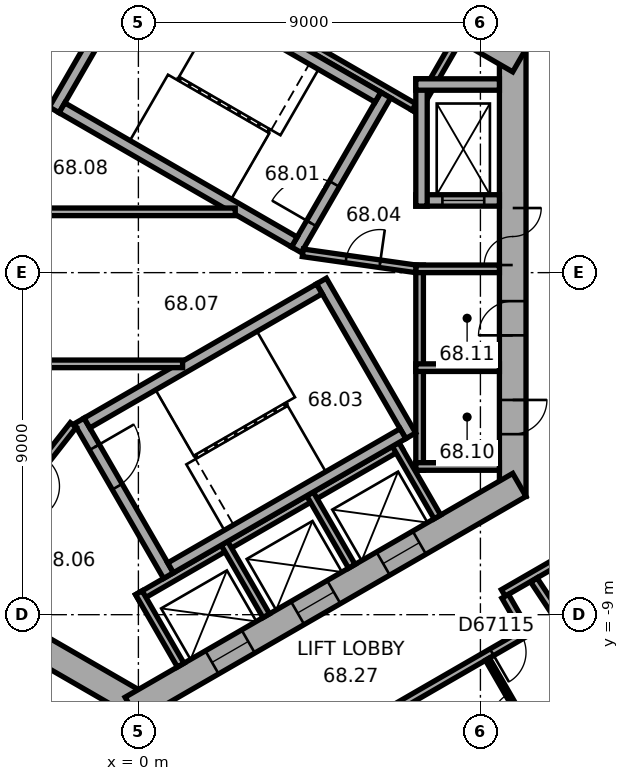
"""IFC4 building model, lengths in metres.
Left out: names, types, materials, properties, quantities, classifications, styles, units other than length and angle.
Written with IfcOpenShell. Run it as: python <this file> out.ifc"""

import sys

from ifc_helpers import new_model, si_unit, direction, frame, frame_2d, origin, place, context, subcontext, project, spatial, rectangle, extrude, element, fill, save


model = new_model("IFC4")
c1 = context("Model", 3, precision=1e-05, world=origin(), true_north=direction((0.0, 1.0)))
c2 = subcontext(c1, "Body", "Model", "MODEL_VIEW")
j1 = project(units=[si_unit("LENGTHUNIT", "METRE"), si_unit("PLANEANGLEUNIT", "RADIAN")], contexts=[c1])
p1 = place(None, origin())
s1 = spatial("IfcSite", under=j1, at=p1, CompositionType="ELEMENT")
p2 = place(p1, origin())
s2 = spatial("IfcBuilding", under=s1, at=p2, CompositionType="ELEMENT")
p3 = place(p2, frame((0.0, 0.0, 274.6)))
s3 = spatial("IfcBuildingStorey", under=s2, at=p3, CompositionType="ELEMENT", Elevation=274.6)
p4 = place(p3, frame((9.85, -5.889, 0.0), z_axis=(0.0, 0.0, 1.0), x_axis=(0.0, 1.0, 0.0)))
e1 = element("IfcWall", 1, at=p4, inside=s3, PredefinedType="SHEAR", context=c2, shape_type="SweptSolid", body=[
    extrude(rectangle(XDim=11.778, YDim=0.7, at=frame_2d((5.889, 0.0))), origin(), (0.0, 0.0, 1.0), 3.7),
])
p5 = place(p4, frame((6.089, 0.0, 0.0)))
e2 = element("IfcOpeningElement", 2, at=p5, cuts=e1, PredefinedType="OPENING", context=c2, shape_type="SweptSolid", body=[
    extrude(rectangle(XDim=1.5, YDim=2.1, at=frame_2d((0.75, 1.05))), frame((0.0, 0.36, 0.0), z_axis=(0.0, -1.0, 0.0), x_axis=(1.0, 0.0, 0.0)), (0.0, 0.0, 1.0), 0.72),
])
p6 = place(p4, frame((1.639, 0.0, 0.0)))
e3 = element("IfcOpeningElement", 3, at=p6, cuts=e1, PredefinedType="OPENING", context=c2, shape_type="SweptSolid", body=[
    extrude(rectangle(XDim=0.9, YDim=2.1, at=frame_2d((0.45, 1.05))), frame((0.0, 0.36, 0.0), z_axis=(0.0, -1.0, 0.0), x_axis=(1.0, 0.0, 0.0)), (0.0, 0.0, 1.0), 0.72),
])
p7 = place(p4, frame((4.239, 0.0, 0.0)))
e4 = element("IfcOpeningElement", 4, at=p7, cuts=e1, PredefinedType="OPENING", context=c2, shape_type="SweptSolid", body=[
    extrude(rectangle(XDim=0.9, YDim=2.1, at=frame_2d((0.45, 1.05))), frame((0.0, 0.36, 0.0), z_axis=(0.0, -1.0, 0.0), x_axis=(1.0, 0.0, 0.0)), (0.0, 0.0, 1.0), 0.72),
])
p8 = place(p3, frame((10.025, 5.586, 0.0), z_axis=(0.0, 0.0, 1.0), x_axis=(-0.866026453023, 0.499998182661, 0.0)))
e5 = element("IfcWall", 5, at=p8, inside=s3, PredefinedType="SHEAR", context=c2, shape_type="SweptSolid", body=[
    extrude(rectangle(XDim=11.778, YDim=0.7, at=frame_2d((5.889, 0.0))), origin(), (0.0, 0.0, 1.0), 3.7),
])
p9 = place(p8, frame((5.139, 0.0, 0.0)))
e6 = element("IfcOpeningElement", 6, at=p9, cuts=e5, PredefinedType="OPENING", context=c2, shape_type="SweptSolid", body=[
    extrude(rectangle(XDim=0.9, YDim=2.1, at=frame_2d((0.45, 1.05))), frame((0.0, 0.36, 0.0), z_axis=(0.0, -1.0, 0.0), x_axis=(1.0, 0.0, 0.0)), (0.0, 0.0, 1.0), 0.72),
])
p10 = place(p3, frame((0.175, 11.475, 0.0), z_axis=(0.0, 0.0, 1.0), x_axis=(-0.866026453023, -0.499998182661, 0.0)))
e7 = element("IfcWall", 7, at=p10, inside=s3, PredefinedType="SHEAR", context=c2, shape_type="SweptSolid", body=[
    extrude(rectangle(XDim=11.778, YDim=0.7, at=frame_2d((5.889, 0.0))), origin(), (0.0, 0.0, 1.0), 3.7),
])
p11 = place(p10, frame((6.089, 0.0, 0.0)))
e8 = element("IfcOpeningElement", 8, at=p11, cuts=e7, PredefinedType="OPENING", context=c2, shape_type="SweptSolid", body=[
    extrude(rectangle(XDim=1.5, YDim=2.1, at=frame_2d((0.75, 1.05))), frame((0.0, 0.36, 0.0), z_axis=(0.0, -1.0, 0.0), x_axis=(1.0, 0.0, 0.0)), (0.0, 0.0, 1.0), 0.72),
])
p12 = place(p10, frame((1.639, 0.0, 0.0)))
e9 = element("IfcOpeningElement", 9, at=p12, cuts=e7, PredefinedType="OPENING", context=c2, shape_type="SweptSolid", body=[
    extrude(rectangle(XDim=0.9, YDim=2.1, at=frame_2d((0.45, 1.05))), frame((0.0, 0.36, 0.0), z_axis=(0.0, -1.0, 0.0), x_axis=(1.0, 0.0, 0.0)), (0.0, 0.0, 1.0), 0.72),
])
p13 = place(p10, frame((4.239, 0.0, 0.0)))
e10 = element("IfcOpeningElement", 10, at=p13, cuts=e7, PredefinedType="OPENING", context=c2, shape_type="SweptSolid", body=[
    extrude(rectangle(XDim=0.9, YDim=2.1, at=frame_2d((0.45, 1.05))), frame((0.0, 0.36, 0.0), z_axis=(0.0, -1.0, 0.0), x_axis=(1.0, 0.0, 0.0)), (0.0, 0.0, 1.0), 0.72),
])
p14 = place(p3, frame((-10.025, -5.586, 0.0), z_axis=(0.0, 0.0, 1.0), x_axis=(0.866026453023, -0.499998182661, 0.0)))
e11 = element("IfcWall", 11, at=p14, inside=s3, PredefinedType="SHEAR", context=c2, shape_type="SweptSolid", body=[
    extrude(rectangle(XDim=11.778, YDim=0.7, at=frame_2d((5.889, 0.0))), origin(), (0.0, 0.0, 1.0), 3.7),
])
p15 = place(p14, frame((6.089, 0.0, 0.0)))
e12 = element("IfcOpeningElement", 12, at=p15, cuts=e11, PredefinedType="OPENING", context=c2, shape_type="SweptSolid", body=[
    extrude(rectangle(XDim=1.5, YDim=2.1, at=frame_2d((0.75, 1.05))), frame((0.0, 0.36, 0.0), z_axis=(0.0, -1.0, 0.0), x_axis=(1.0, 0.0, 0.0)), (0.0, 0.0, 1.0), 0.72),
])
p16 = place(p14, frame((1.539, 0.0, 0.0)))
e13 = element("IfcOpeningElement", 13, at=p16, cuts=e11, PredefinedType="OPENING", context=c2, shape_type="SweptSolid", body=[
    extrude(rectangle(XDim=1.1, YDim=2.1, at=frame_2d((0.55, 1.05))), frame((0.0, 0.36, 0.0), z_axis=(0.0, -1.0, 0.0), x_axis=(1.0, 0.0, 0.0)), (0.0, 0.0, 1.0), 0.72),
])
p17 = place(p14, frame((4.139, 0.0, 0.0)))
e14 = element("IfcOpeningElement", 14, at=p17, cuts=e11, PredefinedType="OPENING", context=c2, shape_type="SweptSolid", body=[
    extrude(rectangle(XDim=1.1, YDim=2.1, at=frame_2d((0.55, 1.05))), frame((0.0, 0.36, 0.0), z_axis=(0.0, -1.0, 0.0), x_axis=(1.0, 0.0, 0.0)), (0.0, 0.0, 1.0), 0.72),
])
p18 = place(p3, frame((-0.175, -11.475, 0.0), z_axis=(0.0, 0.0, 1.0), x_axis=(0.866026453023, 0.499998182661, 0.0)))
e15 = element("IfcWall", 15, at=p18, inside=s3, PredefinedType="SHEAR", context=c2, shape_type="SweptSolid", body=[
    extrude(rectangle(XDim=11.778, YDim=0.7, at=frame_2d((5.889, 0.0))), origin(), (0.0, 0.0, 1.0), 3.7),
])
p19 = place(p18, frame((2.439, 0.0, 0.0)))
e16 = element("IfcOpeningElement", 16, at=p19, cuts=e15, PredefinedType="OPENING", context=c2, shape_type="SweptSolid", body=[
    extrude(rectangle(XDim=1.1, YDim=2.1, at=frame_2d((0.55, 1.05))), frame((0.0, 0.36, 0.0), z_axis=(0.0, -1.0, 0.0), x_axis=(1.0, 0.0, 0.0)), (0.0, 0.0, 1.0), 0.72),
])
p20 = place(p18, frame((5.039, 0.0, 0.0)))
e17 = element("IfcOpeningElement", 17, at=p20, cuts=e15, PredefinedType="OPENING", context=c2, shape_type="SweptSolid", body=[
    extrude(rectangle(XDim=1.1, YDim=2.1, at=frame_2d((0.55, 1.05))), frame((0.0, 0.36, 0.0), z_axis=(0.0, -1.0, 0.0), x_axis=(1.0, 0.0, 0.0)), (0.0, 0.0, 1.0), 0.72),
])
p21 = place(p18, frame((7.639, 0.0, 0.0)))
e18 = element("IfcOpeningElement", 18, at=p21, cuts=e15, PredefinedType="OPENING", context=c2, shape_type="SweptSolid", body=[
    extrude(rectangle(XDim=1.1, YDim=2.1, at=frame_2d((0.55, 1.05))), frame((0.0, 0.36, 0.0), z_axis=(0.0, -1.0, 0.0), x_axis=(1.0, 0.0, 0.0)), (0.0, 0.0, 1.0), 0.72),
])
p22 = place(p3, frame((7.4, -5.2, 0.0), z_axis=(0.0, 0.0, 1.0), x_axis=(0.0, 1.0, 0.0)))
e19 = element("IfcWall", 19, at=p22, inside=s3, PredefinedType="PARTITIONING", context=c2, shape_type="SweptSolid", body=[
    extrude(rectangle(XDim=5.4, YDim=0.2, at=frame_2d((2.7, 0.0))), origin(), (0.0, 0.0, 1.0), 3.35),
])
for number, where, z_axis, x_axis in (
    (20, (7.3, -5.1, 0.0), (0.0, 0.0, 1.0), (1.0, 0.0, 0.0)),
    (21, (7.3, -2.5, 0.0), (0.0, 0.0, 1.0), (1.0, 0.0, 0.0)),
    (22, (7.3, 0.1, 0.0), (0.0, 0.0, 1.0), (1.0, 0.0, 0.0)),
):
    element("IfcWall", number, at=place(p3, frame(where, z_axis=z_axis, x_axis=x_axis)), inside=s3, PredefinedType="PARTITIONING", context=c2, shape_type="SweptSolid", body=[
        extrude(rectangle(XDim=2.2, YDim=0.2, at=frame_2d((1.1, 0.0))), origin(), (0.0, 0.0, 1.0), 3.35),
    ])
p23 = place(p3, frame((7.424, 4.259, 0.0), z_axis=(0.0, 0.0, 1.0), x_axis=(-0.866026010844, 0.49999894854, 0.0)))
e23 = element("IfcWall", 23, at=p23, inside=s3, PredefinedType="PARTITIONING", context=c2, shape_type="SweptSolid", body=[
    extrude(rectangle(XDim=8.0, YDim=0.2, at=frame_2d((4.0, 0.0))), origin(), (0.0, 0.0, 1.0), 3.35),
])
p24 = place(p3, frame((7.287, 4.222, 0.0), z_axis=(0.0, 0.0, 1.0), x_axis=(0.499946605688, 0.86605622881, 0.0)))
e24 = element("IfcWall", 24, at=p24, inside=s3, PredefinedType="PARTITIONING", context=c2, shape_type="SweptSolid", body=[
    extrude(rectangle(XDim=2.2, YDim=0.2, at=frame_2d((1.1, 0.0))), origin(), (0.0, 0.0, 1.0), 3.35),
])
p25 = place(p3, frame((-0.024, -8.559, 0.0), z_axis=(0.0, 0.0, 1.0), x_axis=(0.866026010844, 0.49999894854, 0.0)))
e25 = element("IfcWall", 25, at=p25, inside=s3, PredefinedType="PARTITIONING", context=c2, shape_type="SweptSolid", body=[
    extrude(rectangle(XDim=8.0, YDim=0.2, at=frame_2d((4.0, 0.0))), origin(), (0.0, 0.0, 1.0), 3.35),
])
for number, where, z_axis, x_axis in (
    (26, (0.013, -8.422, 0.0), (0.0, 0.0, 1.0), (0.5, -0.866, 0.0)),
    (27, (2.264, -7.122, 0.0), (0.0, 0.0, 1.0), (0.5, -0.866, 0.0)),
    (28, (4.516, -5.822, 0.0), (0.0, 0.0, 1.0), (0.5, -0.866, 0.0)),
    (29, (6.768, -4.522, 0.0), (0.0, 0.0, 1.0), (0.5, -0.866, 0.0)),
):
    element("IfcWall", number, at=place(p3, frame(where, z_axis=z_axis, x_axis=x_axis)), inside=s3, PredefinedType="PARTITIONING", context=c2, shape_type="SweptSolid", body=[
        extrude(rectangle(XDim=2.2, YDim=0.2, at=frame_2d((1.1, 0.0))), origin(), (0.0, 0.0, 1.0), 3.35),
    ])
p26 = place(p3, frame((4.158, 0.602, 0.0), z_axis=(0.0, 0.0, 1.0), x_axis=(0.499977259774, 0.866038532462, 0.0)))
e30 = element("IfcWall", 30, at=p26, inside=s3, PredefinedType="SHEAR", context=c2, shape_type="SweptSolid", body=[
    extrude(rectangle(XDim=4.7, YDim=0.3, at=frame_2d((2.35, 0.0))), origin(), (0.0, 0.0, 1.0), 3.35),
])
p27 = place(p26, frame((0.8, 0.0, 0.0)))
e31 = element("IfcOpeningElement", 31, at=p27, cuts=e30, PredefinedType="OPENING", context=c2, shape_type="SweptSolid", body=[
    extrude(rectangle(XDim=1.2, YDim=2.1, at=frame_2d((0.6, 1.05))), frame((0.0, 0.16, 0.0), z_axis=(0.0, -1.0, 0.0), x_axis=(1.0, 0.0, 0.0)), (0.0, 0.0, 1.0), 0.32),
])
p28 = place(p3, frame((-2.216, 4.282, 0.0), z_axis=(0.0, 0.0, 1.0), x_axis=(0.499977259774, 0.866038532462, 0.0)))
e32 = element("IfcWall", 32, at=p28, inside=s3, PredefinedType="SHEAR", context=c2, shape_type="SweptSolid", body=[
    extrude(rectangle(XDim=4.7, YDim=0.3, at=frame_2d((2.35, 0.0))), origin(), (0.0, 0.0, 1.0), 3.35),
])
for number, where, z_axis, x_axis in (
    (33, (4.103, 0.807, 0.0), (0.0, 0.0, 1.0), (-0.866, 0.5, 0.0)),
    (34, (6.303, 4.617, 0.0), (0.0, 0.0, 1.0), (-0.866, 0.5, 0.0)),
):
    element("IfcWall", number, at=place(p3, frame(where, z_axis=z_axis, x_axis=x_axis)), inside=s3, PredefinedType="SHEAR", context=c2, shape_type="SweptSolid", body=[
        extrude(rectangle(XDim=7.06, YDim=0.3, at=frame_2d((3.53, 0.0))), origin(), (0.0, 0.0, 1.0), 3.35),
    ])
p29 = place(p3, frame((-1.558, -3.902, 0.0), z_axis=(0.0, 0.0, 1.0), x_axis=(0.499977259774, -0.866038532462, 0.0)))
e35 = element("IfcWall", 35, at=p29, inside=s3, PredefinedType="SHEAR", context=c2, shape_type="SweptSolid", body=[
    extrude(rectangle(XDim=4.7, YDim=0.3, at=frame_2d((2.35, 0.0))), origin(), (0.0, 0.0, 1.0), 3.35),
])
p30 = place(p29, frame((0.8, 0.0, 0.0)))
e36 = element("IfcOpeningElement", 36, at=p30, cuts=e35, PredefinedType="OPENING", context=c2, shape_type="SweptSolid", body=[
    extrude(rectangle(XDim=1.2, YDim=2.1, at=frame_2d((0.6, 1.05))), frame((0.0, 0.16, 0.0), z_axis=(0.0, -1.0, 0.0), x_axis=(1.0, 0.0, 0.0)), (0.0, 0.0, 1.0), 0.32),
])
p31 = place(p3, frame((4.816, -0.222, 0.0), z_axis=(0.0, 0.0, 1.0), x_axis=(0.499977259774, -0.866038532462, 0.0)))
e37 = element("IfcWall", 37, at=p31, inside=s3, PredefinedType="SHEAR", context=c2, shape_type="SweptSolid", body=[
    extrude(rectangle(XDim=4.7, YDim=0.3, at=frame_2d((2.35, 0.0))), origin(), (0.0, 0.0, 1.0), 3.35),
])
for number, where, z_axis, x_axis in (
    (38, (-1.353, -3.957, 0.0), (0.0, 0.0, 1.0), (0.866, 0.5, 0.0)),
    (39, (0.847, -7.767, 0.0), (0.0, 0.0, 1.0), (0.866, 0.5, 0.0)),
):
    element("IfcWall", number, at=place(p3, frame(where, z_axis=z_axis, x_axis=x_axis)), inside=s3, PredefinedType="SHEAR", context=c2, shape_type="SweptSolid", body=[
        extrude(rectangle(XDim=7.06, YDim=0.3, at=frame_2d((3.53, 0.0))), origin(), (0.0, 0.0, 1.0), 3.35),
    ])
p32 = place(p3, frame((7.3, 1.9, 0.0), z_axis=(0.0, 0.0, 1.0), x_axis=(1.0, 0.0, 0.0)))
e40 = element("IfcWall", 40, at=p32, inside=s3, PredefinedType="SHEAR", context=c2, shape_type="SweptSolid", body=[
    extrude(rectangle(XDim=2.2, YDim=0.3, at=frame_2d((1.1, 0.0))), origin(), (0.0, 0.0, 1.0), 3.35),
])
p33 = place(p32, frame((0.7, 0.0, 0.0)))
e41 = element("IfcOpeningElement", 41, at=p33, cuts=e40, PredefinedType="OPENING", context=c2, shape_type="SweptSolid", body=[
    extrude(rectangle(XDim=1.1, YDim=2.1, at=frame_2d((0.55, 1.05))), frame((0.0, 0.16, 0.0), z_axis=(0.0, -1.0, 0.0), x_axis=(1.0, 0.0, 0.0)), (0.0, 0.0, 1.0), 0.32),
])
p34 = place(p3, frame((7.45, 1.75, 0.0), z_axis=(0.0, 0.0, 1.0), x_axis=(0.0, 1.0, 0.0)))
e42 = element("IfcWall", 42, at=p34, inside=s3, PredefinedType="SHEAR", context=c2, shape_type="SweptSolid", body=[
    extrude(rectangle(XDim=3.35, YDim=0.3, at=frame_2d((1.675, 0.0))), origin(), (0.0, 0.0, 1.0), 3.35),
])
p35 = place(p3, frame((7.3, 4.95, 0.0), z_axis=(0.0, 0.0, 1.0), x_axis=(1.0, 0.0, 0.0)))
e43 = element("IfcWall", 43, at=p35, inside=s3, PredefinedType="SHEAR", context=c2, shape_type="SweptSolid", body=[
    extrude(rectangle(XDim=2.2, YDim=0.3, at=frame_2d((1.1, 0.0))), origin(), (0.0, 0.0, 1.0), 3.35),
])
p36 = place(p3, frame((4.327, 0.521, 0.0), z_axis=(0.0, 0.0, 1.0), x_axis=(0.990124376366, -0.14019172346, 0.0)))
e44 = element("IfcWall", 44, at=p36, inside=s3, PredefinedType="PARTITIONING", context=c2, shape_type="SweptSolid", body=[
    extrude(rectangle(XDim=3.002, YDim=0.2, at=frame_2d((1.501, 0.0))), origin(), (0.0, 0.0, 1.0), 3.35),
])
p37 = place(p36, frame((1.15, 0.0, 0.0)))
e45 = element("IfcOpeningElement", 45, at=p37, cuts=e44, PredefinedType="OPENING", context=c2, shape_type="SweptSolid", body=[
    extrude(rectangle(XDim=0.9, YDim=2.1, at=frame_2d((0.45, 1.05))), frame((0.0, 0.11, 0.0), z_axis=(0.0, -1.0, 0.0), x_axis=(1.0, 0.0, 0.0)), (0.0, 0.0, 1.0), 0.22),
])
p38 = place(p3, frame((-1.712, -4.008, 0.0), z_axis=(0.0, 0.0, 1.0), x_axis=(-0.616549420702, -0.787316208287, 0.0)))
e46 = element("IfcWall", 46, at=p38, inside=s3, PredefinedType="PARTITIONING", context=c2, shape_type="SweptSolid", body=[
    extrude(rectangle(XDim=3.002, YDim=0.2, at=frame_2d((1.501, 0.0))), origin(), (0.0, 0.0, 1.0), 3.35),
])
p39 = place(p38, frame((1.15, 0.0, 0.0)))
e47 = element("IfcOpeningElement", 47, at=p39, cuts=e46, PredefinedType="OPENING", context=c2, shape_type="SweptSolid", body=[
    extrude(rectangle(XDim=0.9, YDim=2.1, at=frame_2d((0.45, 1.05))), frame((0.0, 0.11, 0.0), z_axis=(0.0, -1.0, 0.0), x_axis=(1.0, 0.0, 0.0)), (0.0, 0.0, 1.0), 0.22),
])
p40 = place(p3, frame((-2.72, -2.4, 0.0), z_axis=(0.0, 0.0, 1.0), x_axis=(1.0, 0.0, 0.0)))
e48 = element("IfcWall", 48, at=p40, inside=s3, PredefinedType="PARTITIONING", context=c2, shape_type="SweptSolid", body=[
    extrude(rectangle(XDim=3.883, YDim=0.2, at=frame_2d((1.941, 0.0))), origin(), (0.0, 0.0, 1.0), 3.35),
])
p41 = place(p3, frame((-2.72, 1.6, 0.0), z_axis=(0.0, 0.0, 1.0), x_axis=(1.0, 0.0, 0.0)))
e49 = element("IfcWall", 49, at=p41, inside=s3, PredefinedType="PARTITIONING", context=c2, shape_type="SweptSolid", body=[
    extrude(rectangle(XDim=5.269, YDim=0.2, at=frame_2d((2.634, 0.0))), origin(), (0.0, 0.0, 1.0), 3.35),
])
p42 = place(p3, frame((6.71, -11.485, 0.0), z_axis=(0.0, 0.0, 1.0), x_axis=(0.866021232452, 0.500007224889, 0.0)))
e50 = element("IfcWall", 50, at=p42, inside=s3, PredefinedType="PARTITIONING", context=c2, shape_type="SweptSolid", body=[
    extrude(rectangle(XDim=4.032, YDim=0.2, at=frame_2d((2.016, 0.0))), origin(), (0.0, 0.0, 1.0), 3.35),
])
p43 = place(p42, frame((2.991, 0.0, 0.0)))
e51 = element("IfcOpeningElement", 51, at=p43, cuts=e50, PredefinedType="OPENING", context=c2, shape_type="SweptSolid", body=[
    extrude(rectangle(XDim=0.9, YDim=2.1, at=frame_2d((0.45, 1.05))), frame((0.0, 0.11, 0.0), z_axis=(0.0, -1.0, 0.0), x_axis=(1.0, 0.0, 0.0)), (0.0, 0.0, 1.0), 0.22),
])
p44 = place(p3, frame((9.602, -8.428, 0.0), z_axis=(0.0, 0.0, 1.0), x_axis=(0.865999114786, 0.500045531117, 0.0)))
e52 = element("IfcWall", 52, at=p44, inside=s3, PredefinedType="PARTITIONING", context=c2, shape_type="SweptSolid", body=[
    extrude(rectangle(XDim=1.788, YDim=0.2, at=frame_2d((0.894, 0.0))), origin(), (0.0, 0.0, 1.0), 3.35),
])
p45 = place(p3, frame((10.152, -9.382, 0.0), z_axis=(0.0, 0.0, 1.0), x_axis=(-0.499968756647, 0.866043441391, 0.0)))
e53 = element("IfcWall", 53, at=p45, inside=s3, PredefinedType="PARTITIONING", context=c2, shape_type="SweptSolid", body=[
    extrude(rectangle(XDim=1.001, YDim=0.2, at=frame_2d((0.5, 0.0))), origin(), (0.0, 0.0, 1.0), 3.35),
])
p46 = place(p3, frame((10.705, -12.804, 0.0), z_axis=(0.0, 0.0, 1.0), x_axis=(-0.500026023896, 0.86601037836, 0.0)))
e54 = element("IfcWall", 54, at=p46, inside=s3, PredefinedType="PARTITIONING", context=c2, shape_type="SweptSolid", body=[
    extrude(rectangle(XDim=3.04, YDim=0.12, at=frame_2d((1.52, 0.0))), origin(), (0.0, 0.0, 1.0), 3.35),
])
p47 = place(p46, frame((1.07, 0.0, 0.0)))
e55 = element("IfcOpeningElement", 55, at=p47, cuts=e54, PredefinedType="OPENING", context=c2, shape_type="SweptSolid", body=[
    extrude(rectangle(XDim=0.9, YDim=2.1, at=frame_2d((0.45, 1.05))), frame((0.0, 0.07, 0.0), z_axis=(0.0, -1.0, 0.0), x_axis=(1.0, 0.0, 0.0)), (0.0, 0.0, 1.0), 0.14),
])
p48 = place(p3, frame((13.698, -13.059, 0.0), z_axis=(0.0, 0.0, 1.0), x_axis=(-0.551927229301, 0.833892279348, 0.0)))
e56 = element("IfcWall", 56, at=p48, inside=s3, PredefinedType="PARTITIONING", context=c2, shape_type="SweptSolid", body=[
    extrude(rectangle(XDim=5.96, YDim=0.2, at=frame_2d((2.98, 0.0))), origin(), (0.0, 0.0, 1.0), 2.65),
])
p49 = place(p5, origin())
e57 = element("IfcDoor", 57, at=p49, inside=s3, OperationType="DOUBLE_DOOR_SINGLE_SWING", PredefinedType="DOOR", context=c2, shape_type="SweptSolid", body=[
    extrude(rectangle(XDim=1.5, YDim=2.1, at=frame_2d((0.75, 1.05))), frame((0.0, 0.025, 0.0), z_axis=(0.0, -1.0, 0.0), x_axis=(1.0, 0.0, 0.0)), (0.0, 0.0, 1.0), 0.05),
])
fill(e2, e57)
p50 = place(p27, origin())
e58 = element("IfcDoor", 58, at=p50, inside=s3, OperationType="SINGLE_SWING_RIGHT", PredefinedType="DOOR", context=c2, shape_type="SweptSolid", body=[
    extrude(rectangle(XDim=1.2, YDim=2.1, at=frame_2d((0.6, 1.05))), frame((0.0, 0.025, 0.0), z_axis=(0.0, -1.0, 0.0), x_axis=(1.0, 0.0, 0.0)), (0.0, 0.0, 1.0), 0.05),
])
fill(e31, e58)
p51 = place(p30, origin())
e59 = element("IfcDoor", 59, at=p51, inside=s3, OperationType="SINGLE_SWING_RIGHT", PredefinedType="DOOR", context=c2, shape_type="SweptSolid", body=[
    extrude(rectangle(XDim=1.2, YDim=2.1, at=frame_2d((0.6, 1.05))), frame((0.0, 0.025, 0.0), z_axis=(0.0, -1.0, 0.0), x_axis=(1.0, 0.0, 0.0)), (0.0, 0.0, 1.0), 0.05),
])
fill(e36, e59)
p52 = place(p37, origin())
e60 = element("IfcDoor", 60, at=p52, inside=s3, OperationType="SINGLE_SWING_LEFT", PredefinedType="DOOR", context=c2, shape_type="SweptSolid", body=[
    extrude(rectangle(XDim=0.9, YDim=2.1, at=frame_2d((0.45, 1.05))), frame((0.0, 0.025, 0.0), z_axis=(0.0, -1.0, 0.0), x_axis=(1.0, 0.0, 0.0)), (0.0, 0.0, 1.0), 0.05),
])
fill(e45, e60)
p53 = place(p6, origin())
e61 = element("IfcDoor", 61, at=p53, inside=s3, OperationType="SINGLE_SWING_LEFT", PredefinedType="DOOR", context=c2, shape_type="SweptSolid", body=[
    extrude(rectangle(XDim=0.9, YDim=2.1, at=frame_2d((0.45, 1.05))), frame((0.0, 0.025, 0.0), z_axis=(0.0, -1.0, 0.0), x_axis=(1.0, 0.0, 0.0)), (0.0, 0.0, 1.0), 0.05),
])
fill(e3, e61)
p54 = place(p7, origin())
e62 = element("IfcDoor", 62, at=p54, inside=s3, OperationType="SINGLE_SWING_LEFT", PredefinedType="DOOR", context=c2, shape_type="SweptSolid", body=[
    extrude(rectangle(XDim=0.9, YDim=2.1, at=frame_2d((0.45, 1.05))), frame((0.0, 0.025, 0.0), z_axis=(0.0, -1.0, 0.0), x_axis=(1.0, 0.0, 0.0)), (0.0, 0.0, 1.0), 0.05),
])
fill(e4, e62)
p55 = place(p33, origin())
e63 = element("IfcDoor", 63, at=p55, inside=s3, OperationType="DOUBLE_DOOR_SLIDING", PredefinedType="DOOR", context=c2, shape_type="SweptSolid", body=[
    extrude(rectangle(XDim=1.1, YDim=2.1, at=frame_2d((0.55, 1.05))), frame((0.0, 0.025, 0.0), z_axis=(0.0, -1.0, 0.0), x_axis=(1.0, 0.0, 0.0)), (0.0, 0.0, 1.0), 0.05),
])
fill(e41, e63)
p56 = place(p19, origin())
e64 = element("IfcDoor", 64, at=p56, inside=s3, OperationType="DOUBLE_DOOR_SLIDING", PredefinedType="DOOR", context=c2, shape_type="SweptSolid", body=[
    extrude(rectangle(XDim=1.1, YDim=2.1, at=frame_2d((0.55, 1.05))), frame((0.0, 0.025, 0.0), z_axis=(0.0, -1.0, 0.0), x_axis=(1.0, 0.0, 0.0)), (0.0, 0.0, 1.0), 0.05),
])
fill(e16, e64)
p57 = place(p20, origin())
e65 = element("IfcDoor", 65, at=p57, inside=s3, OperationType="DOUBLE_DOOR_SLIDING", PredefinedType="DOOR", context=c2, shape_type="SweptSolid", body=[
    extrude(rectangle(XDim=1.1, YDim=2.1, at=frame_2d((0.55, 1.05))), frame((0.0, 0.025, 0.0), z_axis=(0.0, -1.0, 0.0), x_axis=(1.0, 0.0, 0.0)), (0.0, 0.0, 1.0), 0.05),
])
fill(e17, e65)
p58 = place(p21, origin())
e66 = element("IfcDoor", 66, at=p58, inside=s3, OperationType="DOUBLE_DOOR_SLIDING", PredefinedType="DOOR", context=c2, shape_type="SweptSolid", body=[
    extrude(rectangle(XDim=1.1, YDim=2.1, at=frame_2d((0.55, 1.05))), frame((0.0, 0.025, 0.0), z_axis=(0.0, -1.0, 0.0), x_axis=(1.0, 0.0, 0.0)), (0.0, 0.0, 1.0), 0.05),
])
fill(e18, e66)
p59 = place(p43, origin())
e67 = element("IfcDoor", 67, at=p59, inside=s3, OperationType="SINGLE_SWING_LEFT", PredefinedType="DOOR", context=c2, shape_type="SweptSolid", body=[
    extrude(rectangle(XDim=0.9, YDim=2.1, at=frame_2d((0.45, 1.05))), frame((0.0, 0.025, 0.0), z_axis=(0.0, -1.0, 0.0), x_axis=(1.0, 0.0, 0.0)), (0.0, 0.0, 1.0), 0.05),
])
fill(e51, e67)
p60 = place(p47, origin())
e68 = element("IfcDoor", 68, at=p60, inside=s3, OperationType="SINGLE_SWING_LEFT", PredefinedType="DOOR", context=c2, shape_type="SweptSolid", body=[
    extrude(rectangle(XDim=0.9, YDim=2.1, at=frame_2d((0.45, 1.05))), frame((0.0, 0.025, 0.0), z_axis=(0.0, -1.0, 0.0), x_axis=(1.0, 0.0, 0.0)), (0.0, 0.0, 1.0), 0.05),
])
fill(e55, e68)
save(model, sys.argv[1])
